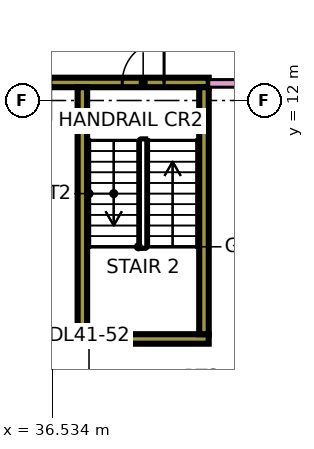
"""IFC4 building model, lengths in metres.
Left out: names, types, materials, properties, quantities, classifications, styles, units other than length and angle.
Written with IfcOpenShell. Run it as: python <this file> out.ifc"""

import sys

from ifc_helpers import new_model, si_unit, direction, frame, frame_2d, origin, place, context, subcontext, project, spatial, rectangle, extrude, element, fill, save


model = new_model("IFC4")
c1 = context("Model", 3, precision=1e-05, world=origin(), true_north=direction((0.0, 1.0)))
c2 = subcontext(c1, "Body", "Model", "MODEL_VIEW")
j1 = project(units=[si_unit("LENGTHUNIT", "METRE"), si_unit("PLANEANGLEUNIT", "RADIAN")], contexts=[c1])
p1 = place(None, origin())
s1 = spatial("IfcSite", under=j1, at=p1, CompositionType="ELEMENT")
p2 = place(p1, origin())
s2 = spatial("IfcBuilding", under=s1, at=p2, CompositionType="ELEMENT")
p3 = place(p2, frame((0.0, 0.0, 179.9)))
s3 = spatial("IfcBuildingStorey", under=s2, at=p3, CompositionType="ELEMENT", Elevation=179.9)
p4 = place(p3, frame((37.2, 5.725, 0.0), z_axis=(0.0, 0.0, 1.0), x_axis=(1.0, 0.0, 0.0)))
e1 = element("IfcWall", 1, at=p4, inside=s3, PredefinedType="SHEAR", context=c2, shape_type="SweptSolid", body=[
    extrude(rectangle(XDim=3.45, YDim=0.25, at=frame_2d((1.725, 0.0))), origin(), (0.0, 0.0, 1.0), 3.75),
])
p5 = place(p3, frame((36.45, 12.475, 0.0), z_axis=(0.0, 0.0, 1.0), x_axis=(1.0, 0.0, 0.0)))
e2 = element("IfcWall", 2, at=p5, inside=s3, PredefinedType="SHEAR", context=c2, shape_type="SweptSolid", body=[
    extrude(rectangle(XDim=4.2, YDim=0.25, at=frame_2d((2.1, 0.0))), origin(), (0.0, 0.0, 1.0), 3.75),
])
p6 = place(p5, frame((1.925, 0.0, 0.0)))
e3 = element("IfcOpeningElement", 3, at=p6, cuts=e2, PredefinedType="OPENING", context=c2, shape_type="SweptSolid", body=[
    extrude(rectangle(XDim=1.1, YDim=2.2, at=frame_2d((0.55, 1.1))), frame((0.0, 0.135, 0.0), z_axis=(0.0, -1.0, 0.0), x_axis=(1.0, 0.0, 0.0)), (0.0, 0.0, 1.0), 0.27),
])
for number, where, z_axis, x_axis in (
    (4, (37.325, 5.85, 0.0), (0.0, 0.0, 1.0), (0.0, 1.0, 0.0)),
    (5, (40.525, 5.85, 0.0), (0.0, 0.0, 1.0), (0.0, 1.0, 0.0)),
):
    element("IfcWall", number, at=place(p3, frame(where, z_axis=z_axis, x_axis=x_axis)), inside=s3, PredefinedType="SHEAR", context=c2, shape_type="SweptSolid", body=[
        extrude(rectangle(XDim=6.5, YDim=0.25, at=frame_2d((3.25, 0.0))), origin(), (0.0, 0.0, 1.0), 3.75),
    ])
p7 = place(p3, frame((40.65, 12.45, 0.0), z_axis=(0.0, 0.0, 1.0), x_axis=(1.0, 0.0, 0.0)))
e6 = element("IfcWall", 6, at=p7, inside=s3, PredefinedType="PARTITIONING", context=c2, shape_type="SweptSolid", body=[
    extrude(rectangle(XDim=22.276, YDim=0.2, at=frame_2d((11.138, 0.0))), origin(), (0.0, 0.0, 1.0), 3.35),
])
p8 = place(p7, frame((20.1, 0.0, 0.0)))
e7 = element("IfcOpeningElement", 7, at=p8, cuts=e6, PredefinedType="OPENING", context=c2, shape_type="SweptSolid", body=[
    extrude(rectangle(XDim=1.0, YDim=2.1, at=frame_2d((0.5, 1.05))), frame((0.0, 0.11, 0.0), z_axis=(0.0, -1.0, 0.0), x_axis=(1.0, 0.0, 0.0)), (0.0, 0.0, 1.0), 0.22),
])
p9 = place(p7, frame((1.05, 0.0, 0.0)))
e8 = element("IfcOpeningElement", 8, at=p9, cuts=e6, PredefinedType="OPENING", context=c2, shape_type="SweptSolid", body=[
    extrude(rectangle(XDim=1.0, YDim=2.1, at=frame_2d((0.5, 1.05))), frame((0.0, 0.11, 0.0), z_axis=(0.0, -1.0, 0.0), x_axis=(1.0, 0.0, 0.0)), (0.0, 0.0, 1.0), 0.22),
])
p10 = place(p6, frame((1.1, 0.0, 0.0), z_axis=(0.0, 0.0, 1.0), x_axis=(-1.0, 0.0, 0.0)))
e9 = element("IfcDoor", 9, at=p10, inside=s3, OperationType="SINGLE_SWING_RIGHT", PredefinedType="DOOR", context=c2, shape_type="SweptSolid", body=[
    extrude(rectangle(XDim=1.1, YDim=2.2, at=frame_2d((0.55, 1.1))), frame((0.0, 0.025, 0.0), z_axis=(0.0, -1.0, 0.0), x_axis=(1.0, 0.0, 0.0)), (0.0, 0.0, 1.0), 0.05),
])
fill(e3, e9)
save(model, sys.argv[1])
